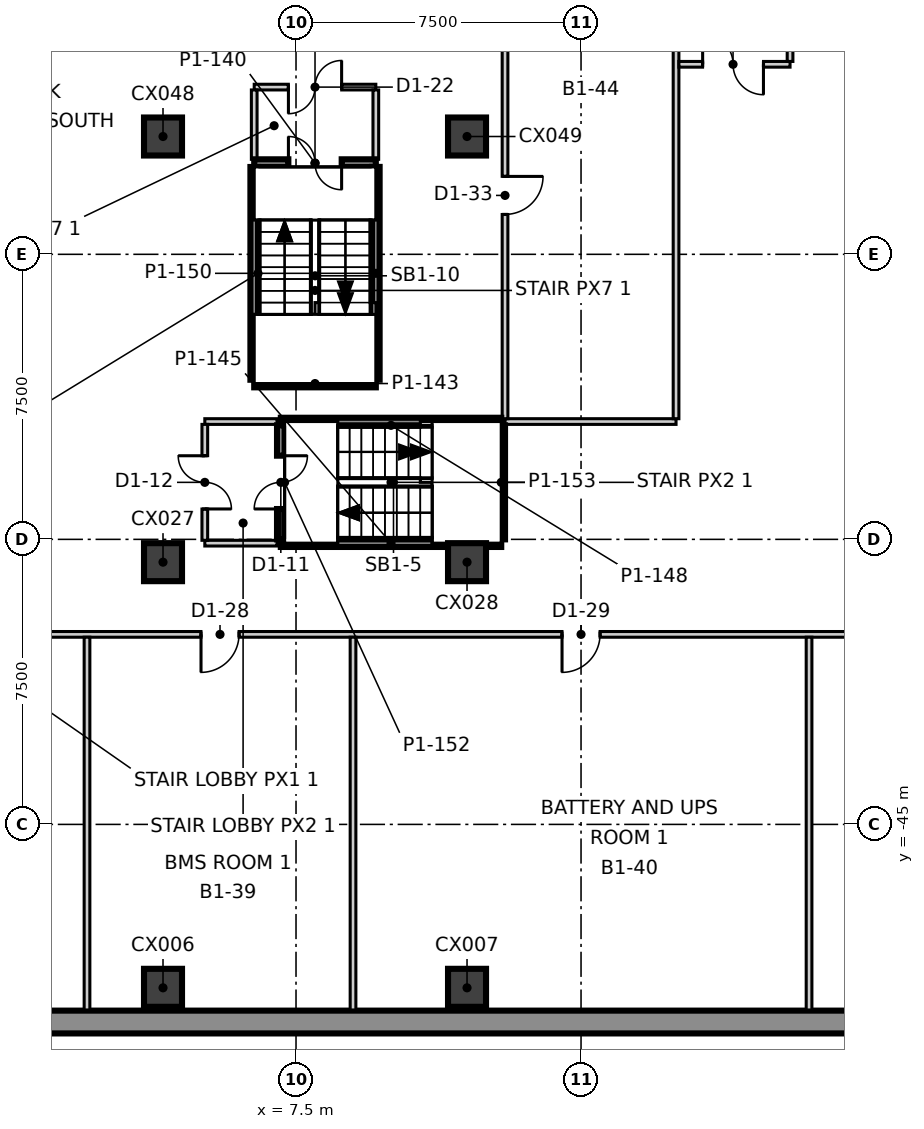
"""IFC4 building model, lengths in metres.
Left out: names, types, materials, properties, quantities, classifications, styles, units other than length and angle.
Written with IfcOpenShell. Run it as: python <this file> out.ifc"""

import sys

from ifc_helpers import new_model, si_unit, direction, frame, frame_2d, origin, origin_2d, place, context, subcontext, project, spatial, rectangle, extrude, element, fill, save


model = new_model("IFC4")
c1 = context("Model", 3, precision=1e-05, world=origin(), true_north=direction((0.0, 1.0)))
c2 = subcontext(c1, "Body", "Model", "MODEL_VIEW")
j1 = project(units=[si_unit("LENGTHUNIT", "METRE"), si_unit("PLANEANGLEUNIT", "RADIAN")], contexts=[c1])
p1 = place(None, origin())
s1 = spatial("IfcSite", under=j1, at=p1, CompositionType="ELEMENT")
p2 = place(p1, origin())
s2 = spatial("IfcBuilding", under=s1, at=p2, CompositionType="ELEMENT")
p3 = place(p2, frame((0.0, 0.0, -5.5)))
s3 = spatial("IfcBuildingStorey", under=s2, at=p3, CompositionType="ELEMENT", Elevation=-5.5)
p4 = place(p3, frame((-39.7, -50.2, -0.4), z_axis=(0.0, 0.0, 1.0), x_axis=(1.0, 0.0, 0.0)))
e1 = element("IfcWall", 1, at=p4, inside=s3, PredefinedType="SOLIDWALL", context=c2, shape_type="SweptSolid", body=[
    extrude(rectangle(XDim=79.4, YDim=0.6, at=frame_2d((39.7, 0.0))), origin(), (0.0, 0.0, 1.0), 5.5),
])
for number, where, z_axis, x_axis in (
    (2, (4.0, -49.3, -0.4), (0.0, 0.0, 1.0), (1.0, 0.0, 0.0)),
    (3, (12.0, -49.3, -0.4), (0.0, 0.0, 1.0), (1.0, 0.0, 0.0)),
    (4, (4.0, -38.1, -0.4), (0.0, 0.0, 1.0), (1.0, 0.0, 0.0)),
    (5, (12.0, -38.1, -0.4), (0.0, 0.0, 1.0), (1.0, 0.0, 0.0)),
    (6, (4.0, -26.9, -0.4), (0.0, 0.0, 1.0), (1.0, 0.0, 0.0)),
    (7, (12.0, -26.9, -0.4), (0.0, 0.0, 1.0), (1.0, 0.0, 0.0)),
):
    element("IfcColumn", number, at=place(p3, frame(where, z_axis=z_axis, x_axis=x_axis)), inside=s3, PredefinedType="COLUMN", context=c2, shape_type="SweptSolid", body=[
        extrude(rectangle(XDim=1.0, YDim=1.0, at=origin_2d()), origin(), (0.0, 0.0, 1.0), 5.5),
    ])
p5 = place(p3, frame((-39.4, -40.0, 0.0), z_axis=(0.0, 0.0, 1.0), x_axis=(1.0, 0.0, 0.0)))
e8 = element("IfcWall", 8, at=p5, inside=s3, PredefinedType="PARTITIONING", context=c2, shape_type="SweptSolid", body=[
    extrude(rectangle(XDim=78.8, YDim=0.15, at=frame_2d((39.4, 0.0))), origin(), (0.0, 0.0, 1.0), 5.1),
])
p6 = place(p5, frame((9.6, 0.0, 0.0)))
e9 = element("IfcOpeningElement", 9, at=p6, cuts=e8, PredefinedType="OPENING", context=c2, shape_type="SweptSolid", body=[
    extrude(rectangle(XDim=1.2, YDim=2.1, at=frame_2d((0.6, 1.05))), frame((0.0, 0.085, 0.0), z_axis=(0.0, -1.0, 0.0), x_axis=(1.0, 0.0, 0.0)), (0.0, 0.0, 1.0), 0.17),
])
p7 = place(p5, frame((24.9, 0.0, 0.0)))
e10 = element("IfcOpeningElement", 10, at=p7, cuts=e8, PredefinedType="OPENING", context=c2, shape_type="SweptSolid", body=[
    extrude(rectangle(XDim=1.0, YDim=2.1, at=frame_2d((0.5, 1.05))), frame((0.0, 0.085, 0.0), z_axis=(0.0, -1.0, 0.0), x_axis=(1.0, 0.0, 0.0)), (0.0, 0.0, 1.0), 0.17),
])
p8 = place(p5, frame((33.54, 0.0, 0.0)))
e11 = element("IfcOpeningElement", 11, at=p8, cuts=e8, PredefinedType="OPENING", context=c2, shape_type="SweptSolid", body=[
    extrude(rectangle(XDim=1.0, YDim=2.1, at=frame_2d((0.5, 1.05))), frame((0.0, 0.085, 0.0), z_axis=(0.0, -1.0, 0.0), x_axis=(1.0, 0.0, 0.0)), (0.0, 0.0, 1.0), 0.17),
])
p9 = place(p5, frame((44.4, 0.0, 0.0)))
e12 = element("IfcOpeningElement", 12, at=p9, cuts=e8, PredefinedType="OPENING", context=c2, shape_type="SweptSolid", body=[
    extrude(rectangle(XDim=1.0, YDim=2.1, at=frame_2d((0.5, 1.05))), frame((0.0, 0.085, 0.0), z_axis=(0.0, -1.0, 0.0), x_axis=(1.0, 0.0, 0.0)), (0.0, 0.0, 1.0), 0.17),
])
p10 = place(p5, frame((53.9, 0.0, 0.0)))
e13 = element("IfcOpeningElement", 13, at=p10, cuts=e8, PredefinedType="OPENING", context=c2, shape_type="SweptSolid", body=[
    extrude(rectangle(XDim=1.0, YDim=2.1, at=frame_2d((0.5, 1.05))), frame((0.0, 0.085, 0.0), z_axis=(0.0, -1.0, 0.0), x_axis=(1.0, 0.0, 0.0)), (0.0, 0.0, 1.0), 0.17),
])
p11 = place(p5, frame((65.7, 0.0, 0.0)))
e14 = element("IfcOpeningElement", 14, at=p11, cuts=e8, PredefinedType="OPENING", context=c2, shape_type="SweptSolid", body=[
    extrude(rectangle(XDim=1.2, YDim=2.1, at=frame_2d((0.6, 1.05))), frame((0.0, 0.085, 0.0), z_axis=(0.0, -1.0, 0.0), x_axis=(1.0, 0.0, 0.0)), (0.0, 0.0, 1.0), 0.17),
])
p12 = place(p3, frame((6.4, -25.6, 0.0), z_axis=(0.0, 0.0, 1.0), x_axis=(1.0, 0.0, 0.0)))
e15 = element("IfcWall", 15, at=p12, inside=s3, PredefinedType="PARTITIONING", context=c2, shape_type="SweptSolid", body=[
    extrude(rectangle(XDim=3.2, YDim=0.15, at=frame_2d((1.6, 0.0))), origin(), (0.0, 0.0, 1.0), 5.1),
])
p13 = place(p12, frame((0.9, 0.0, 0.0)))
e16 = element("IfcOpeningElement", 16, at=p13, cuts=e15, PredefinedType="OPENING", context=c2, shape_type="SweptSolid", body=[
    extrude(rectangle(XDim=1.4, YDim=2.1, at=frame_2d((0.7, 1.05))), frame((0.0, 0.085, 0.0), z_axis=(0.0, -1.0, 0.0), x_axis=(1.0, 0.0, 0.0)), (0.0, 0.0, 1.0), 0.17),
])
p14 = place(p3, frame((5.1, -34.4, 0.0), z_axis=(0.0, 0.0, 1.0), x_axis=(1.0, 0.0, 0.0)))
e17 = element("IfcWall", 17, at=p14, inside=s3, PredefinedType="PARTITIONING", context=c2, shape_type="SweptSolid", body=[
    extrude(rectangle(XDim=1.9, YDim=0.15, at=frame_2d((0.95, 0.0))), origin(), (0.0, 0.0, 1.0), 5.1),
])
p15 = place(p3, frame((13.0, -34.4, 0.0), z_axis=(0.0, 0.0, 1.0), x_axis=(1.0, 0.0, 0.0)))
e18 = element("IfcWall", 18, at=p15, inside=s3, PredefinedType="PARTITIONING", context=c2, shape_type="SweptSolid", body=[
    extrude(rectangle(XDim=4.5, YDim=0.15, at=frame_2d((2.25, 0.0))), origin(), (0.0, 0.0, 1.0), 5.1),
])
p16 = place(p3, frame((5.1, -37.6, 0.0), z_axis=(0.0, 0.0, 1.0), x_axis=(1.0, 0.0, 0.0)))
e19 = element("IfcWall", 19, at=p16, inside=s3, PredefinedType="PARTITIONING", context=c2, shape_type="SweptSolid", body=[
    extrude(rectangle(XDim=1.9, YDim=0.15, at=frame_2d((0.95, 0.0))), origin(), (0.0, 0.0, 1.0), 5.1),
])
p17 = place(p3, frame((2.0, -49.9, 0.0), z_axis=(0.0, 0.0, 1.0), x_axis=(0.0, 1.0, 0.0)))
e20 = element("IfcWall", 20, at=p17, inside=s3, PredefinedType="PARTITIONING", context=c2, shape_type="SweptSolid", body=[
    extrude(rectangle(XDim=9.825, YDim=0.15, at=frame_2d((4.913, 0.0))), origin(), (0.0, 0.0, 1.0), 5.1),
])
for number, where, z_axis, x_axis in (
    (21, (6.4, -27.5, 0.0), (0.0, 0.0, 1.0), (0.0, 1.0, 0.0)),
    (22, (9.6, -27.5, 0.0), (0.0, 0.0, 1.0), (0.0, 1.0, 0.0)),
):
    element("IfcWall", number, at=place(p3, frame(where, z_axis=z_axis, x_axis=x_axis)), inside=s3, PredefinedType="PARTITIONING", context=c2, shape_type="SweptSolid", body=[
        extrude(rectangle(XDim=1.825, YDim=0.15, at=frame_2d((0.913, 0.0))), origin(), (0.0, 0.0, 1.0), 5.1),
    ])
p18 = place(p3, frame((5.1, -37.525, 0.0), z_axis=(0.0, 0.0, 1.0), x_axis=(0.0, 1.0, 0.0)))
e23 = element("IfcWall", 23, at=p18, inside=s3, PredefinedType="PARTITIONING", context=c2, shape_type="SweptSolid", body=[
    extrude(rectangle(XDim=3.05, YDim=0.15, at=frame_2d((1.525, 0.0))), origin(), (0.0, 0.0, 1.0), 5.1),
])
p19 = place(p18, frame((0.825, 0.0, 0.0)))
e24 = element("IfcOpeningElement", 24, at=p19, cuts=e23, PredefinedType="OPENING", context=c2, shape_type="SweptSolid", body=[
    extrude(rectangle(XDim=1.4, YDim=2.1, at=frame_2d((0.7, 1.05))), frame((0.0, 0.085, 0.0), z_axis=(0.0, -1.0, 0.0), x_axis=(1.0, 0.0, 0.0)), (0.0, 0.0, 1.0), 0.17),
])
p20 = place(p3, frame((9.0, -49.9, 0.0), z_axis=(0.0, 0.0, 1.0), x_axis=(0.0, 1.0, 0.0)))
e25 = element("IfcWall", 25, at=p20, inside=s3, PredefinedType="PARTITIONING", context=c2, shape_type="SweptSolid", body=[
    extrude(rectangle(XDim=9.825, YDim=0.15, at=frame_2d((4.913, 0.0))), origin(), (0.0, 0.0, 1.0), 5.1),
])
p21 = place(p3, frame((17.5, -34.325, 0.0), z_axis=(0.0, 0.0, 1.0), x_axis=(0.0, 1.0, 0.0)))
e26 = element("IfcWall", 26, at=p21, inside=s3, PredefinedType="PARTITIONING", context=c2, shape_type="SweptSolid", body=[
    extrude(rectangle(XDim=11.825, YDim=0.15, at=frame_2d((5.913, 0.0))), origin(), (0.0, 0.0, 1.0), 5.1),
])
p22 = place(p3, frame((13.0, -34.325, 0.0), z_axis=(0.0, 0.0, 1.0), x_axis=(0.0, 1.0, 0.0)))
e27 = element("IfcWall", 27, at=p22, inside=s3, PredefinedType="PARTITIONING", context=c2, shape_type="SweptSolid", body=[
    extrude(rectangle(XDim=11.825, YDim=0.15, at=frame_2d((5.913, 0.0))), origin(), (0.0, 0.0, 1.0), 5.1),
])
p23 = place(p22, frame((5.375, 0.0, 0.0)))
e28 = element("IfcOpeningElement", 28, at=p23, cuts=e27, PredefinedType="OPENING", context=c2, shape_type="SweptSolid", body=[
    extrude(rectangle(XDim=1.0, YDim=2.1, at=frame_2d((0.5, 1.05))), frame((0.0, 0.085, 0.0), z_axis=(0.0, -1.0, 0.0), x_axis=(1.0, 0.0, 0.0)), (0.0, 0.0, 1.0), 0.17),
])
p24 = place(p3, frame((21.0, -49.9, 0.0), z_axis=(0.0, 0.0, 1.0), x_axis=(0.0, 1.0, 0.0)))
e29 = element("IfcWall", 29, at=p24, inside=s3, PredefinedType="PARTITIONING", context=c2, shape_type="SweptSolid", body=[
    extrude(rectangle(XDim=9.825, YDim=0.15, at=frame_2d((4.913, 0.0))), origin(), (0.0, 0.0, 1.0), 5.1),
])
p25 = place(p3, frame((17.575, -25.0, 0.0), z_axis=(0.0, 0.0, 1.0), x_axis=(1.0, 0.0, 0.0)))
e30 = element("IfcWall", 30, at=p25, inside=s3, PredefinedType="PARTITIONING", context=c2, shape_type="SweptSolid", body=[
    extrude(rectangle(XDim=2.925, YDim=0.15, at=frame_2d((1.462, 0.0))), origin(), (0.0, 0.0, 1.0), 5.1),
])
p26 = place(p25, frame((0.625, 0.0, 0.0)))
e31 = element("IfcOpeningElement", 31, at=p26, cuts=e30, PredefinedType="OPENING", context=c2, shape_type="SweptSolid", body=[
    extrude(rectangle(XDim=1.6, YDim=2.1, at=frame_2d((0.8, 1.05))), frame((0.0, 0.085, 0.0), z_axis=(0.0, -1.0, 0.0), x_axis=(1.0, 0.0, 0.0)), (0.0, 0.0, 1.0), 0.17),
])
p27 = place(p3, frame((20.5, -24.925, 0.0), z_axis=(0.0, 0.0, 1.0), x_axis=(0.0, 1.0, 0.0)))
e32 = element("IfcWall", 32, at=p27, inside=s3, PredefinedType="PARTITIONING", context=c2, shape_type="SweptSolid", body=[
    extrude(rectangle(XDim=2.427, YDim=0.15, at=frame_2d((1.213, 0.0))), origin(), (0.0, 0.0, 1.0), 5.1),
])
p28 = place(p3, frame((6.4, -27.6, 0.0), z_axis=(0.0, 0.0, 1.0), x_axis=(1.0, 0.0, 0.0)))
e33 = element("IfcWall", 33, at=p28, inside=s3, PredefinedType="SOLIDWALL", context=c2, shape_type="SweptSolid", body=[
    extrude(rectangle(XDim=3.2, YDim=0.2, at=frame_2d((1.6, 0.0))), origin(), (0.0, 0.0, 1.0), 5.1),
])
p29 = place(p28, frame((0.9, 0.0, 0.0)))
e34 = element("IfcOpeningElement", 34, at=p29, cuts=e33, PredefinedType="OPENING", context=c2, shape_type="SweptSolid", body=[
    extrude(rectangle(XDim=1.4, YDim=2.1, at=frame_2d((0.7, 1.05))), frame((0.0, 0.11, 0.0), z_axis=(0.0, -1.0, 0.0), x_axis=(1.0, 0.0, 0.0)), (0.0, 0.0, 1.0), 0.22),
])
p30 = place(p3, frame((6.4, -33.4, 0.0), z_axis=(0.0, 0.0, 1.0), x_axis=(1.0, 0.0, 0.0)))
e35 = element("IfcWall", 35, at=p30, inside=s3, PredefinedType="SOLIDWALL", context=c2, shape_type="SweptSolid", body=[
    extrude(rectangle(XDim=3.2, YDim=0.2, at=frame_2d((1.6, 0.0))), origin(), (0.0, 0.0, 1.0), 5.1),
])
for number, where, z_axis, x_axis in (
    (36, (7.1, -37.6, 0.0), (0.0, 0.0, 1.0), (1.0, 0.0, 0.0)),
    (37, (7.1, -34.4, 0.0), (0.0, 0.0, 1.0), (1.0, 0.0, 0.0)),
):
    element("IfcWall", number, at=place(p3, frame(where, z_axis=z_axis, x_axis=x_axis)), inside=s3, PredefinedType="SOLIDWALL", context=c2, shape_type="SweptSolid", body=[
        extrude(rectangle(XDim=5.8, YDim=0.2, at=frame_2d((2.9, 0.0))), origin(), (0.0, 0.0, 1.0), 5.1),
    ])
p31 = place(p3, frame((9.6, -33.3, 0.0), z_axis=(0.0, 0.0, 1.0), x_axis=(0.0, 1.0, 0.0)))
e38 = element("IfcWall", 38, at=p31, inside=s3, PredefinedType="SOLIDWALL", context=c2, shape_type="SweptSolid", body=[
    extrude(rectangle(XDim=5.6, YDim=0.2, at=frame_2d((2.8, 0.0))), origin(), (0.0, 0.0, 1.0), 5.1),
])
p32 = place(p3, frame((6.4, -33.3, 0.0), z_axis=(0.0, 0.0, 1.0), x_axis=(0.0, 1.0, 0.0)))
e39 = element("IfcWall", 39, at=p32, inside=s3, PredefinedType="SOLIDWALL", context=c2, shape_type="SweptSolid", body=[
    extrude(rectangle(XDim=5.598, YDim=0.2, at=frame_2d((2.799, 0.0))), origin(), (0.0, 0.0, 1.0), 5.1),
])
p33 = place(p3, frame((7.1, -37.5, 0.0), z_axis=(0.0, 0.0, 1.0), x_axis=(0.0, 1.0, 0.0)))
e40 = element("IfcWall", 40, at=p33, inside=s3, PredefinedType="SOLIDWALL", context=c2, shape_type="SweptSolid", body=[
    extrude(rectangle(XDim=3.0, YDim=0.2, at=frame_2d((1.5, 0.0))), origin(), (0.0, 0.0, 1.0), 5.1),
])
p34 = place(p33, frame((0.8, 0.0, 0.0)))
e41 = element("IfcOpeningElement", 41, at=p34, cuts=e40, PredefinedType="OPENING", context=c2, shape_type="SweptSolid", body=[
    extrude(rectangle(XDim=1.4, YDim=2.1, at=frame_2d((0.7, 1.05))), frame((0.0, 0.11, 0.0), z_axis=(0.0, -1.0, 0.0), x_axis=(1.0, 0.0, 0.0)), (0.0, 0.0, 1.0), 0.22),
])
p35 = place(p3, frame((12.9, -37.5, 0.0), z_axis=(0.0, 0.0, 1.0), x_axis=(0.0, 1.0, 0.0)))
e42 = element("IfcWall", 42, at=p35, inside=s3, PredefinedType="SOLIDWALL", context=c2, shape_type="SweptSolid", body=[
    extrude(rectangle(XDim=3.0, YDim=0.2, at=frame_2d((1.5, 0.0))), origin(), (0.0, 0.0, 1.0), 5.1),
])
p36 = place(p26, origin())
e43 = element("IfcDoor", 43, at=p36, inside=s3, OperationType="DOUBLE_DOOR_SINGLE_SWING", PredefinedType="DOOR", context=c2, shape_type="SweptSolid", body=[
    extrude(rectangle(XDim=1.6, YDim=2.1, at=frame_2d((0.8, 1.05))), frame((0.0, 0.025, 0.0), z_axis=(0.0, -1.0, 0.0), x_axis=(1.0, 0.0, 0.0)), (0.0, 0.0, 1.0), 0.05),
])
fill(e31, e43)
p37 = place(p34, origin())
e44 = element("IfcDoor", 44, at=p37, inside=s3, OperationType="DOUBLE_DOOR_SINGLE_SWING", PredefinedType="DOOR", context=c2, shape_type="SweptSolid", body=[
    extrude(rectangle(XDim=1.4, YDim=2.1, at=frame_2d((0.7, 1.05))), frame((0.0, 0.025, 0.0), z_axis=(0.0, -1.0, 0.0), x_axis=(1.0, 0.0, 0.0)), (0.0, 0.0, 1.0), 0.05),
])
fill(e41, e44)
p38 = place(p19, origin())
e45 = element("IfcDoor", 45, at=p38, inside=s3, OperationType="DOUBLE_DOOR_SINGLE_SWING", PredefinedType="DOOR", context=c2, shape_type="SweptSolid", body=[
    extrude(rectangle(XDim=1.4, YDim=2.1, at=frame_2d((0.7, 1.05))), frame((0.0, 0.025, 0.0), z_axis=(0.0, -1.0, 0.0), x_axis=(1.0, 0.0, 0.0)), (0.0, 0.0, 1.0), 0.05),
])
fill(e24, e45)
p39 = place(p29, origin())
e46 = element("IfcDoor", 46, at=p39, inside=s3, OperationType="DOUBLE_DOOR_SINGLE_SWING", PredefinedType="DOOR", context=c2, shape_type="SweptSolid", body=[
    extrude(rectangle(XDim=1.4, YDim=2.1, at=frame_2d((0.7, 1.05))), frame((0.0, 0.025, 0.0), z_axis=(0.0, -1.0, 0.0), x_axis=(1.0, 0.0, 0.0)), (0.0, 0.0, 1.0), 0.05),
])
fill(e34, e46)
p40 = place(p13, origin())
e47 = element("IfcDoor", 47, at=p40, inside=s3, OperationType="DOUBLE_DOOR_SINGLE_SWING", PredefinedType="DOOR", context=c2, shape_type="SweptSolid", body=[
    extrude(rectangle(XDim=1.4, YDim=2.1, at=frame_2d((0.7, 1.05))), frame((0.0, 0.025, 0.0), z_axis=(0.0, -1.0, 0.0), x_axis=(1.0, 0.0, 0.0)), (0.0, 0.0, 1.0), 0.05),
])
fill(e16, e47)
p41 = place(p9, origin())
e48 = element("IfcDoor", 48, at=p41, inside=s3, OperationType="SINGLE_SWING_LEFT", PredefinedType="DOOR", context=c2, shape_type="SweptSolid", body=[
    extrude(rectangle(XDim=1.0, YDim=2.1, at=frame_2d((0.5, 1.05))), frame((0.0, 0.025, 0.0), z_axis=(0.0, -1.0, 0.0), x_axis=(1.0, 0.0, 0.0)), (0.0, 0.0, 1.0), 0.05),
])
fill(e12, e48)
p42 = place(p10, origin())
e49 = element("IfcDoor", 49, at=p42, inside=s3, OperationType="SINGLE_SWING_LEFT", PredefinedType="DOOR", context=c2, shape_type="SweptSolid", body=[
    extrude(rectangle(XDim=1.0, YDim=2.1, at=frame_2d((0.5, 1.05))), frame((0.0, 0.025, 0.0), z_axis=(0.0, -1.0, 0.0), x_axis=(1.0, 0.0, 0.0)), (0.0, 0.0, 1.0), 0.05),
])
fill(e13, e49)
p43 = place(p23, origin())
e50 = element("IfcDoor", 50, at=p43, inside=s3, OperationType="SINGLE_SWING_RIGHT", PredefinedType="DOOR", context=c2, shape_type="SweptSolid", body=[
    extrude(rectangle(XDim=1.0, YDim=2.1, at=frame_2d((0.5, 1.05))), frame((0.0, 0.025, 0.0), z_axis=(0.0, -1.0, 0.0), x_axis=(1.0, 0.0, 0.0)), (0.0, 0.0, 1.0), 0.05),
])
fill(e28, e50)
save(model, sys.argv[1])
